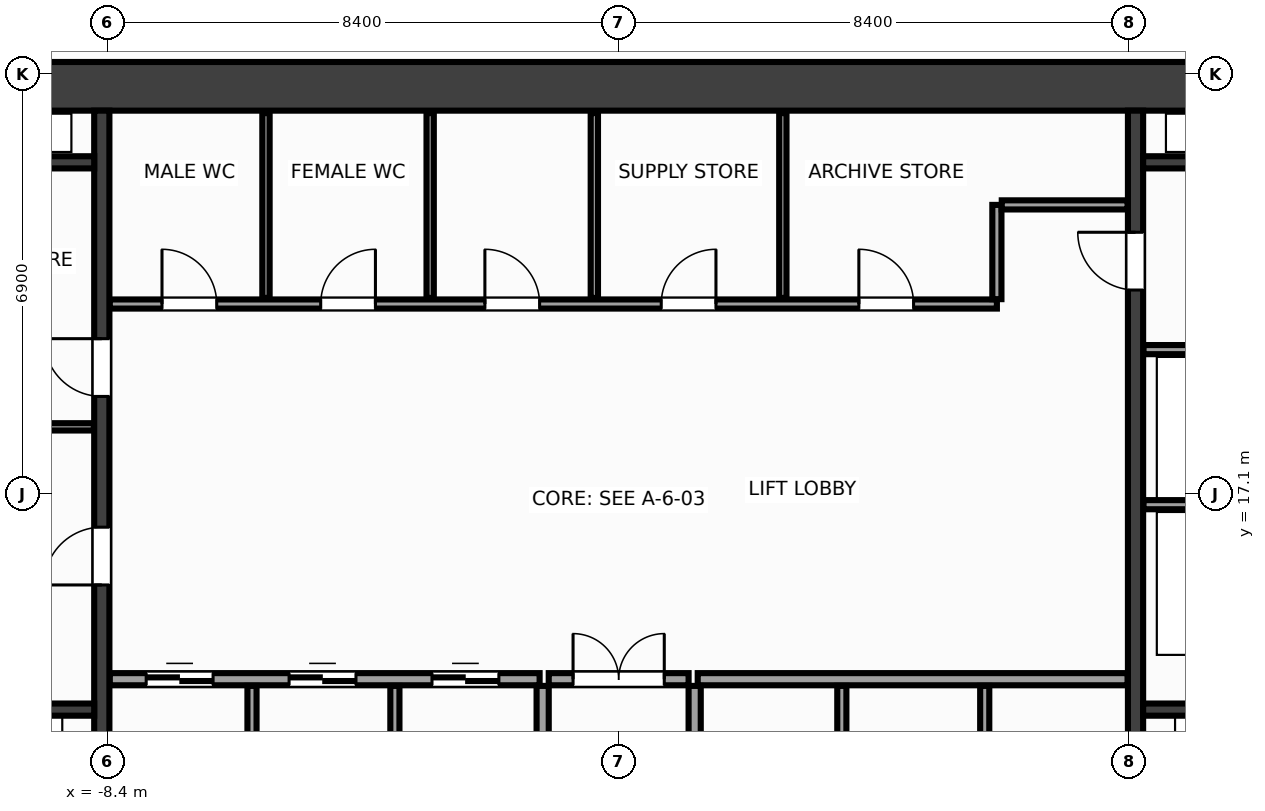
"""IFC4 building model, lengths in metres.
Left out: names, types, materials, properties, quantities, classifications, styles, units other than length and angle.
Written with IfcOpenShell. Run it as: python <this file> out.ifc"""

import sys

from ifc_helpers import new_model, si_unit, direction, frame, frame_2d, origin, place, context, subcontext, project, spatial, rectangle, extrude, source, transform, mapped, element, fill, save


model = new_model("IFC4")
c1 = context("Model", 3, precision=1e-05, world=origin(), true_north=direction((0.0, 1.0)))
c2 = subcontext(c1, "Body", "Model", "MODEL_VIEW")
j1 = project(units=[si_unit("LENGTHUNIT", "METRE"), si_unit("PLANEANGLEUNIT", "RADIAN")], contexts=[c1])
p1 = place(None, origin())
s1 = spatial("IfcSite", under=j1, at=p1, CompositionType="ELEMENT")
p2 = place(p1, origin())
s2 = spatial("IfcBuilding", under=s1, at=p2, CompositionType="ELEMENT")
p3 = place(p2, frame((0.0, 0.0, 59.6)))
s3 = spatial("IfcBuildingStorey", under=s2, at=p3, CompositionType="ELEMENT", Elevation=59.6)
m1 = source(origin(), c2, "Body", "SweptSolid", [
    extrude(rectangle(XDim=32.0, YDim=0.8, at=frame_2d((16.0, 0.0))), origin(), (0.0, 0.0, 1.0), 3.6),
])
p4 = place(p3, frame((-16.0, 23.8, 0.0), z_axis=(0.0, 0.0, 1.0), x_axis=(1.0, 0.0, 0.0)))
e1 = element("IfcWall", 1, at=p4, inside=s3, PredefinedType="SHEAR", context=c2, shape_type="MappedRepresentation", body=[
    mapped(m1, transform((0.0, 0.0, 0.0), x_axis=(1.0, 0.0, 0.0), y_axis=(0.0, 1.0, 0.0), z_axis=(0.0, 0.0, 1.0), scale=1.0)),
])
m2 = source(origin(), c2, "Body", "SweptSolid", [
    extrude(rectangle(XDim=12.8, YDim=0.25, at=frame_2d((6.4, 0.0))), origin(), (0.0, 0.0, 1.0), 3.6),
])
p5 = place(p3, frame((-8.5, 10.6, 0.0), z_axis=(0.0, 0.0, 1.0), x_axis=(0.0, 1.0, 0.0)))
e2 = element("IfcWall", 2, at=p5, inside=s3, PredefinedType="SHEAR", context=c2, shape_type="MappedRepresentation", body=[
    mapped(m2, transform((0.0, 0.0, 0.0), x_axis=(1.0, 0.0, 0.0), y_axis=(0.0, 1.0, 0.0), z_axis=(0.0, 0.0, 1.0), scale=1.0)),
])
p6 = place(p5, frame((5.0, 0.0, 0.0)))
e3 = element("IfcOpeningElement", 3, at=p6, cuts=e2, PredefinedType="OPENING", context=c2, shape_type="SweptSolid", body=[
    extrude(rectangle(XDim=0.95, YDim=2.15, at=frame_2d((0.475, 1.075))), frame((0.0, 0.137, 0.0), z_axis=(0.0, -1.0, 0.0), x_axis=(1.0, 0.0, 0.0)), (0.0, 0.0, 1.0), 0.274),
])
p7 = place(p5, frame((8.1, 0.0, 0.0)))
e4 = element("IfcOpeningElement", 4, at=p7, cuts=e2, PredefinedType="OPENING", context=c2, shape_type="SweptSolid", body=[
    extrude(rectangle(XDim=0.95, YDim=2.15, at=frame_2d((0.475, 1.075))), frame((0.0, 0.137, 0.0), z_axis=(0.0, -1.0, 0.0), x_axis=(1.0, 0.0, 0.0)), (0.0, 0.0, 1.0), 0.274),
])
p8 = place(p3, frame((8.5, 10.6, 0.0), z_axis=(0.0, 0.0, 1.0), x_axis=(0.0, 1.0, 0.0)))
e5 = element("IfcWall", 5, at=p8, inside=s3, PredefinedType="SHEAR", context=c2, shape_type="MappedRepresentation", body=[
    mapped(m2, transform((0.0, 0.0, 0.0), x_axis=(1.0, 0.0, 0.0), y_axis=(0.0, 1.0, 0.0), z_axis=(0.0, 0.0, 1.0), scale=1.0)),
])
p9 = place(p8, frame((9.85, 0.0, 0.0)))
e6 = element("IfcOpeningElement", 6, at=p9, cuts=e5, PredefinedType="OPENING", context=c2, shape_type="SweptSolid", body=[
    extrude(rectangle(XDim=0.95, YDim=2.15, at=frame_2d((0.475, 1.075))), frame((0.0, 0.137, 0.0), z_axis=(0.0, -1.0, 0.0), x_axis=(1.0, 0.0, 0.0)), (0.0, 0.0, 1.0), 0.274),
])
m3 = source(origin(), c2, "Body", "SweptSolid", [
    extrude(rectangle(XDim=2.825, YDim=0.2, at=frame_2d((1.413, 0.0))), origin(), (0.0, 0.0, 1.0), 3.6),
])
for number, where, z_axis, x_axis in (
    (7, (-11.45, 13.55, 0.0), (0.0, 0.0, 1.0), (1.0, 0.0, 0.0)),
    (8, (8.625, 13.55, 0.0), (0.0, 0.0, 1.0), (1.0, 0.0, 0.0)),
):
    element("IfcWall", number, at=place(p3, frame(where, z_axis=z_axis, x_axis=x_axis)), inside=s3, PredefinedType="SHEAR", context=c2, shape_type="MappedRepresentation", body=[
        mapped(m3, transform((0.0, 0.0, 0.0), x_axis=(1.0, 0.0, 0.0), y_axis=(0.0, 1.0, 0.0), z_axis=(0.0, 0.0, 1.0), scale=1.0)),
    ])
m4 = source(origin(), c2, "Body", "SweptSolid", [
    extrude(rectangle(XDim=3.02, YDim=0.2, at=frame_2d((1.51, 0.0))), origin(), (0.0, 0.0, 1.0), 3.6),
])
for number, where, z_axis, x_axis in (
    (9, (-11.645, 22.55, 0.0), (0.0, 0.0, 1.0), (1.0, 0.0, 0.0)),
    (10, (8.625, 22.55, 0.0), (0.0, 0.0, 1.0), (1.0, 0.0, 0.0)),
):
    element("IfcWall", number, at=place(p3, frame(where, z_axis=z_axis, x_axis=x_axis)), inside=s3, PredefinedType="SHEAR", context=c2, shape_type="MappedRepresentation", body=[
        mapped(m4, transform((0.0, 0.0, 0.0), x_axis=(1.0, 0.0, 0.0), y_axis=(0.0, 1.0, 0.0), z_axis=(0.0, 0.0, 1.0), scale=1.0)),
    ])
m5 = source(origin(), c2, "Body", "SweptSolid", [
    extrude(rectangle(XDim=3.01, YDim=0.12, at=frame_2d((1.505, 0.0))), origin(), (0.0, 0.0, 1.0), 3.36),
])
p10 = place(p3, frame((-11.64, 18.2, 0.0), z_axis=(0.0, 0.0, 1.0), x_axis=(1.0, 0.0, 0.0)))
e11 = element("IfcWall", 11, at=p10, inside=s3, PredefinedType="PARTITIONING", context=c2, shape_type="MappedRepresentation", body=[
    mapped(m5, transform((0.0, 0.0, 0.0), x_axis=(1.0, 0.0, 0.0), y_axis=(0.0, 1.0, 0.0), z_axis=(0.0, 0.0, 1.0), scale=1.0)),
])
m6 = source(origin(), c2, "Body", "SweptSolid", [
    extrude(rectangle(XDim=3.01, YDim=0.15, at=frame_2d((1.505, 0.0))), origin(), (0.0, 0.0, 1.0), 3.36),
])
for number, where, z_axis, x_axis in (
    (12, (8.63, 16.92, 0.0), (0.0, 0.0, 1.0), (1.0, 0.0, 0.0)),
    (13, (8.63, 19.47, 0.0), (0.0, 0.0, 1.0), (1.0, 0.0, 0.0)),
):
    element("IfcWall", number, at=place(p3, frame(where, z_axis=z_axis, x_axis=x_axis)), inside=s3, PredefinedType="PARTITIONING", context=c2, shape_type="MappedRepresentation", body=[
        mapped(m6, transform((0.0, 0.0, 0.0), x_axis=(1.0, 0.0, 0.0), y_axis=(0.0, 1.0, 0.0), z_axis=(0.0, 0.0, 1.0), scale=1.0)),
    ])
m7 = source(origin(), c2, "Body", "SweptSolid", [
    extrude(rectangle(XDim=7.07, YDim=0.2, at=frame_2d((3.535, 0.0))), origin(), (0.0, 0.0, 1.0), 3.36),
])
p11 = place(p3, frame((-8.37, 14.05, 0.0), z_axis=(0.0, 0.0, 1.0), x_axis=(1.0, 0.0, 0.0)))
e14 = element("IfcWall", 14, at=p11, inside=s3, PredefinedType="PARTITIONING", context=c2, shape_type="MappedRepresentation", body=[
    mapped(m7, transform((0.0, 0.0, 0.0), x_axis=(1.0, 0.0, 0.0), y_axis=(0.0, 1.0, 0.0), z_axis=(0.0, 0.0, 1.0), scale=1.0)),
])
p12 = place(p11, frame((0.6, 0.0, 0.0)))
e15 = element("IfcOpeningElement", 15, at=p12, cuts=e14, PredefinedType="OPENING", context=c2, shape_type="SweptSolid", body=[
    extrude(rectangle(XDim=1.1, YDim=2.15, at=frame_2d((0.55, 1.075))), frame((0.0, 0.112, 0.0), z_axis=(0.0, -1.0, 0.0), x_axis=(1.0, 0.0, 0.0)), (0.0, 0.0, 1.0), 0.224),
])
p13 = place(p11, frame((2.95, 0.0, 0.0)))
e16 = element("IfcOpeningElement", 16, at=p13, cuts=e14, PredefinedType="OPENING", context=c2, shape_type="SweptSolid", body=[
    extrude(rectangle(XDim=1.1, YDim=2.15, at=frame_2d((0.55, 1.075))), frame((0.0, 0.112, 0.0), z_axis=(0.0, -1.0, 0.0), x_axis=(1.0, 0.0, 0.0)), (0.0, 0.0, 1.0), 0.224),
])
p14 = place(p11, frame((5.3, 0.0, 0.0)))
e17 = element("IfcOpeningElement", 17, at=p14, cuts=e14, PredefinedType="OPENING", context=c2, shape_type="SweptSolid", body=[
    extrude(rectangle(XDim=1.1, YDim=2.15, at=frame_2d((0.55, 1.075))), frame((0.0, 0.112, 0.0), z_axis=(0.0, -1.0, 0.0), x_axis=(1.0, 0.0, 0.0)), (0.0, 0.0, 1.0), 0.224),
])
p15 = place(p3, frame((1.3, 14.05, 0.0), z_axis=(0.0, 0.0, 1.0), x_axis=(1.0, 0.0, 0.0)))
e18 = element("IfcWall", 18, at=p15, inside=s3, PredefinedType="PARTITIONING", context=c2, shape_type="MappedRepresentation", body=[
    mapped(m7, transform((0.0, 0.0, 0.0), x_axis=(1.0, 0.0, 0.0), y_axis=(0.0, 1.0, 0.0), z_axis=(0.0, 0.0, 1.0), scale=1.0)),
])
m8 = source(origin(), c2, "Body", "SweptSolid", [
    extrude(rectangle(XDim=3.34, YDim=0.2, at=frame_2d((1.67, 0.0))), origin(), (0.0, 0.0, 1.0), 3.36),
])
for number, where, z_axis, x_axis in (
    (19, (-1.25, 10.6, 0.0), (0.0, 0.0, 1.0), (0.0, 1.0, 0.0)),
    (20, (1.25, 10.6, 0.0), (0.0, 0.0, 1.0), (0.0, 1.0, 0.0)),
):
    element("IfcWall", number, at=place(p3, frame(where, z_axis=z_axis, x_axis=x_axis)), inside=s3, PredefinedType="PARTITIONING", context=c2, shape_type="MappedRepresentation", body=[
        mapped(m8, transform((0.0, 0.0, 0.0), x_axis=(1.0, 0.0, 0.0), y_axis=(0.0, 1.0, 0.0), z_axis=(0.0, 0.0, 1.0), scale=1.0)),
    ])
m9 = source(origin(), c2, "Body", "SweptSolid", [
    extrude(rectangle(XDim=2.3, YDim=0.2, at=frame_2d((1.15, 0.0))), origin(), (0.0, 0.0, 1.0), 3.36),
])
p16 = place(p3, frame((-1.15, 14.05, 0.0), z_axis=(0.0, 0.0, 1.0), x_axis=(1.0, 0.0, 0.0)))
e21 = element("IfcWall", 21, at=p16, inside=s3, PredefinedType="PARTITIONING", context=c2, shape_type="MappedRepresentation", body=[
    mapped(m9, transform((0.0, 0.0, 0.0), x_axis=(1.0, 0.0, 0.0), y_axis=(0.0, 1.0, 0.0), z_axis=(0.0, 0.0, 1.0), scale=1.0)),
])
p17 = place(p16, frame((0.4, 0.0, 0.0)))
e22 = element("IfcOpeningElement", 22, at=p17, cuts=e21, PredefinedType="OPENING", context=c2, shape_type="SweptSolid", body=[
    extrude(rectangle(XDim=1.5, YDim=2.2, at=frame_2d((0.75, 1.1))), frame((0.0, 0.112, 0.0), z_axis=(0.0, -1.0, 0.0), x_axis=(1.0, 0.0, 0.0)), (0.0, 0.0, 1.0), 0.224),
])
m10 = source(origin(), c2, "Body", "SweptSolid", [
    extrude(rectangle(XDim=14.59, YDim=0.15, at=frame_2d((7.295, 0.0))), origin(), (0.0, 0.0, 1.0), 3.36),
])
p18 = place(p3, frame((-8.37, 20.22, 0.0), z_axis=(0.0, 0.0, 1.0), x_axis=(1.0, 0.0, 0.0)))
e23 = element("IfcWall", 23, at=p18, inside=s3, PredefinedType="PARTITIONING", context=c2, shape_type="MappedRepresentation", body=[
    mapped(m10, transform((0.0, 0.0, 0.0), x_axis=(1.0, 0.0, 0.0), y_axis=(0.0, 1.0, 0.0), z_axis=(0.0, 0.0, 1.0), scale=1.0)),
])
p19 = place(p18, frame((0.86, 0.0, 0.0)))
e24 = element("IfcOpeningElement", 24, at=p19, cuts=e23, PredefinedType="OPENING", context=c2, shape_type="SweptSolid", body=[
    extrude(rectangle(XDim=0.9, YDim=2.15, at=frame_2d((0.45, 1.075))), frame((0.0, 0.087, 0.0), z_axis=(0.0, -1.0, 0.0), x_axis=(1.0, 0.0, 0.0)), (0.0, 0.0, 1.0), 0.174),
])
p20 = place(p18, frame((3.47, 0.0, 0.0)))
e25 = element("IfcOpeningElement", 25, at=p20, cuts=e23, PredefinedType="OPENING", context=c2, shape_type="SweptSolid", body=[
    extrude(rectangle(XDim=0.9, YDim=2.15, at=frame_2d((0.45, 1.075))), frame((0.0, 0.087, 0.0), z_axis=(0.0, -1.0, 0.0), x_axis=(1.0, 0.0, 0.0)), (0.0, 0.0, 1.0), 0.174),
])
p21 = place(p18, frame((6.17, 0.0, 0.0)))
e26 = element("IfcOpeningElement", 26, at=p21, cuts=e23, PredefinedType="OPENING", context=c2, shape_type="SweptSolid", body=[
    extrude(rectangle(XDim=0.9, YDim=2.15, at=frame_2d((0.45, 1.075))), frame((0.0, 0.087, 0.0), z_axis=(0.0, -1.0, 0.0), x_axis=(1.0, 0.0, 0.0)), (0.0, 0.0, 1.0), 0.174),
])
p22 = place(p18, frame((9.07, 0.0, 0.0)))
e27 = element("IfcOpeningElement", 27, at=p22, cuts=e23, PredefinedType="OPENING", context=c2, shape_type="SweptSolid", body=[
    extrude(rectangle(XDim=0.9, YDim=2.15, at=frame_2d((0.45, 1.075))), frame((0.0, 0.087, 0.0), z_axis=(0.0, -1.0, 0.0), x_axis=(1.0, 0.0, 0.0)), (0.0, 0.0, 1.0), 0.174),
])
p23 = place(p18, frame((12.32, 0.0, 0.0)))
e28 = element("IfcOpeningElement", 28, at=p23, cuts=e23, PredefinedType="OPENING", context=c2, shape_type="SweptSolid", body=[
    extrude(rectangle(XDim=0.9, YDim=2.15, at=frame_2d((0.45, 1.075))), frame((0.0, 0.087, 0.0), z_axis=(0.0, -1.0, 0.0), x_axis=(1.0, 0.0, 0.0)), (0.0, 0.0, 1.0), 0.174),
])
m11 = source(origin(), c2, "Body", "SweptSolid", [
    extrude(rectangle(XDim=1.55, YDim=0.15, at=frame_2d((0.775, 0.0))), origin(), (0.0, 0.0, 1.0), 3.36),
])
p24 = place(p3, frame((6.22, 20.3, 0.0), z_axis=(0.0, 0.0, 1.0), x_axis=(0.0, 1.0, 0.0)))
e29 = element("IfcWall", 29, at=p24, inside=s3, PredefinedType="PARTITIONING", context=c2, shape_type="MappedRepresentation", body=[
    mapped(m11, transform((0.0, 0.0, 0.0), x_axis=(1.0, 0.0, 0.0), y_axis=(0.0, 1.0, 0.0), z_axis=(0.0, 0.0, 1.0), scale=1.0)),
])
m12 = source(origin(), c2, "Body", "SweptSolid", [
    extrude(rectangle(XDim=2.07, YDim=0.15, at=frame_2d((1.035, 0.0))), origin(), (0.0, 0.0, 1.0), 3.36),
])
p25 = place(p3, frame((6.3, 21.85, 0.0), z_axis=(0.0, 0.0, 1.0), x_axis=(1.0, 0.0, 0.0)))
e30 = element("IfcWall", 30, at=p25, inside=s3, PredefinedType="PARTITIONING", context=c2, shape_type="MappedRepresentation", body=[
    mapped(m12, transform((0.0, 0.0, 0.0), x_axis=(1.0, 0.0, 0.0), y_axis=(0.0, 1.0, 0.0), z_axis=(0.0, 0.0, 1.0), scale=1.0)),
])
m13 = source(origin(), c2, "Body", "SweptSolid", [
    extrude(rectangle(XDim=3.34, YDim=0.15, at=frame_2d((1.67, 0.0))), origin(), (0.0, 0.0, 1.0), 3.36),
])
for number, where, z_axis, x_axis in (
    (31, (-6.03, 10.6, 0.0), (0.0, 0.0, 1.0), (0.0, 1.0, 0.0)),
    (32, (-3.68, 10.6, 0.0), (0.0, 0.0, 1.0), (0.0, 1.0, 0.0)),
    (33, (3.67, 10.6, 0.0), (0.0, 0.0, 1.0), (0.0, 1.0, 0.0)),
    (34, (6.02, 10.6, 0.0), (0.0, 0.0, 1.0), (0.0, 1.0, 0.0)),
):
    element("IfcWall", number, at=place(p3, frame(where, z_axis=z_axis, x_axis=x_axis)), inside=s3, PredefinedType="PARTITIONING", context=c2, shape_type="MappedRepresentation", body=[
        mapped(m13, transform((0.0, 0.0, 0.0), x_axis=(1.0, 0.0, 0.0), y_axis=(0.0, 1.0, 0.0), z_axis=(0.0, 0.0, 1.0), scale=1.0)),
    ])
m14 = source(origin(), c2, "Body", "SweptSolid", [
    extrude(rectangle(XDim=3.04, YDim=0.12, at=frame_2d((1.52, 0.0))), origin(), (0.0, 0.0, 1.0), 3.36),
])
for number, where, z_axis, x_axis in (
    (35, (-5.8, 20.32, 0.0), (0.0, 0.0, 1.0), (0.0, 1.0, 0.0)),
    (36, (-3.1, 20.32, 0.0), (0.0, 0.0, 1.0), (0.0, 1.0, 0.0)),
    (37, (-0.4, 20.32, 0.0), (0.0, 0.0, 1.0), (0.0, 1.0, 0.0)),
    (38, (2.7, 20.32, 0.0), (0.0, 0.0, 1.0), (0.0, 1.0, 0.0)),
):
    element("IfcWall", number, at=place(p3, frame(where, z_axis=z_axis, x_axis=x_axis)), inside=s3, PredefinedType="PARTITIONING", context=c2, shape_type="MappedRepresentation", body=[
        mapped(m14, transform((0.0, 0.0, 0.0), x_axis=(1.0, 0.0, 0.0), y_axis=(0.0, 1.0, 0.0), z_axis=(0.0, 0.0, 1.0), scale=1.0)),
    ])
m15 = source(origin(), c2, "Body", "SweptSolid", [
    extrude(rectangle(XDim=0.95, YDim=2.15, at=frame_2d((0.475, 1.075))), frame((0.0, 0.025, 0.0), z_axis=(0.0, -1.0, 0.0), x_axis=(1.0, 0.0, 0.0)), (0.0, 0.0, 1.0), 0.05),
])
p26 = place(p6, origin())
e39 = element("IfcDoor", 39, at=p26, inside=s3, OperationType="SINGLE_SWING_LEFT", PredefinedType="DOOR", context=c2, shape_type="MappedRepresentation", body=[
    mapped(m15, transform((0.0, 0.0, 0.0), x_axis=(1.0, 0.0, 0.0), y_axis=(0.0, 1.0, 0.0), z_axis=(0.0, 0.0, 1.0), scale=1.0)),
])
fill(e3, e39)
p27 = place(p7, origin())
e40 = element("IfcDoor", 40, at=p27, inside=s3, OperationType="SINGLE_SWING_RIGHT", PredefinedType="DOOR", context=c2, shape_type="MappedRepresentation", body=[
    mapped(m15, transform((0.0, 0.0, 0.0), x_axis=(1.0, 0.0, 0.0), y_axis=(0.0, 1.0, 0.0), z_axis=(0.0, 0.0, 1.0), scale=1.0)),
])
fill(e4, e40)
m16 = source(origin(), c2, "Body", "SweptSolid", [
    extrude(rectangle(XDim=0.95, YDim=2.15, at=frame_2d((0.475, 1.075))), frame((0.0, 0.025, 0.0), z_axis=(0.0, -1.0, 0.0), x_axis=(1.0, 0.0, 0.0)), (0.0, 0.0, 1.0), 0.05),
])
p28 = place(p9, origin())
e41 = element("IfcDoor", 41, at=p28, inside=s3, OperationType="SINGLE_SWING_RIGHT", PredefinedType="DOOR", context=c2, shape_type="MappedRepresentation", body=[
    mapped(m16, transform((0.0, 0.0, 0.0), x_axis=(1.0, 0.0, 0.0), y_axis=(0.0, 1.0, 0.0), z_axis=(0.0, 0.0, 1.0), scale=1.0)),
])
fill(e6, e41)
m17 = source(origin(), c2, "Body", "SweptSolid", [
    extrude(rectangle(XDim=1.1, YDim=2.15, at=frame_2d((0.55, 1.075))), frame((0.0, 0.025, 0.0), z_axis=(0.0, -1.0, 0.0), x_axis=(1.0, 0.0, 0.0)), (0.0, 0.0, 1.0), 0.05),
])
p29 = place(p12, origin())
e42 = element("IfcDoor", 42, at=p29, inside=s3, OperationType="DOUBLE_DOOR_SLIDING", PredefinedType="DOOR", context=c2, shape_type="MappedRepresentation", body=[
    mapped(m17, transform((0.0, 0.0, 0.0), x_axis=(1.0, 0.0, 0.0), y_axis=(0.0, 1.0, 0.0), z_axis=(0.0, 0.0, 1.0), scale=1.0)),
])
fill(e15, e42)
p30 = place(p13, origin())
e43 = element("IfcDoor", 43, at=p30, inside=s3, OperationType="DOUBLE_DOOR_SLIDING", PredefinedType="DOOR", context=c2, shape_type="MappedRepresentation", body=[
    mapped(m17, transform((0.0, 0.0, 0.0), x_axis=(1.0, 0.0, 0.0), y_axis=(0.0, 1.0, 0.0), z_axis=(0.0, 0.0, 1.0), scale=1.0)),
])
fill(e16, e43)
p31 = place(p14, origin())
e44 = element("IfcDoor", 44, at=p31, inside=s3, OperationType="DOUBLE_DOOR_SLIDING", PredefinedType="DOOR", context=c2, shape_type="MappedRepresentation", body=[
    mapped(m17, transform((0.0, 0.0, 0.0), x_axis=(1.0, 0.0, 0.0), y_axis=(0.0, 1.0, 0.0), z_axis=(0.0, 0.0, 1.0), scale=1.0)),
])
fill(e17, e44)
m18 = source(origin(), c2, "Body", "SweptSolid", [
    extrude(rectangle(XDim=1.5, YDim=2.2, at=frame_2d((0.75, 1.1))), frame((0.0, 0.025, 0.0), z_axis=(0.0, -1.0, 0.0), x_axis=(1.0, 0.0, 0.0)), (0.0, 0.0, 1.0), 0.05),
])
p32 = place(p17, origin())
e45 = element("IfcDoor", 45, at=p32, inside=s3, OperationType="DOUBLE_DOOR_SINGLE_SWING", PredefinedType="DOOR", context=c2, shape_type="MappedRepresentation", body=[
    mapped(m18, transform((0.0, 0.0, 0.0), x_axis=(1.0, 0.0, 0.0), y_axis=(0.0, 1.0, 0.0), z_axis=(0.0, 0.0, 1.0), scale=1.0)),
])
fill(e22, e45)
m19 = source(origin(), c2, "Body", "SweptSolid", [
    extrude(rectangle(XDim=0.9, YDim=2.15, at=frame_2d((0.45, 1.075))), frame((0.0, 0.025, 0.0), z_axis=(0.0, -1.0, 0.0), x_axis=(1.0, 0.0, 0.0)), (0.0, 0.0, 1.0), 0.05),
])
p33 = place(p19, origin())
e46 = element("IfcDoor", 46, at=p33, inside=s3, OperationType="SINGLE_SWING_LEFT", PredefinedType="DOOR", context=c2, shape_type="MappedRepresentation", body=[
    mapped(m19, transform((0.0, 0.0, 0.0), x_axis=(1.0, 0.0, 0.0), y_axis=(0.0, 1.0, 0.0), z_axis=(0.0, 0.0, 1.0), scale=1.0)),
])
fill(e24, e46)
p34 = place(p20, origin())
e47 = element("IfcDoor", 47, at=p34, inside=s3, OperationType="SINGLE_SWING_RIGHT", PredefinedType="DOOR", context=c2, shape_type="MappedRepresentation", body=[
    mapped(m19, transform((0.0, 0.0, 0.0), x_axis=(1.0, 0.0, 0.0), y_axis=(0.0, 1.0, 0.0), z_axis=(0.0, 0.0, 1.0), scale=1.0)),
])
fill(e25, e47)
p35 = place(p21, origin())
e48 = element("IfcDoor", 48, at=p35, inside=s3, OperationType="SINGLE_SWING_LEFT", PredefinedType="DOOR", context=c2, shape_type="MappedRepresentation", body=[
    mapped(m19, transform((0.0, 0.0, 0.0), x_axis=(1.0, 0.0, 0.0), y_axis=(0.0, 1.0, 0.0), z_axis=(0.0, 0.0, 1.0), scale=1.0)),
])
fill(e26, e48)
p36 = place(p22, origin())
e49 = element("IfcDoor", 49, at=p36, inside=s3, OperationType="SINGLE_SWING_RIGHT", PredefinedType="DOOR", context=c2, shape_type="MappedRepresentation", body=[
    mapped(m19, transform((0.0, 0.0, 0.0), x_axis=(1.0, 0.0, 0.0), y_axis=(0.0, 1.0, 0.0), z_axis=(0.0, 0.0, 1.0), scale=1.0)),
])
fill(e27, e49)
p37 = place(p23, origin())
e50 = element("IfcDoor", 50, at=p37, inside=s3, OperationType="SINGLE_SWING_LEFT", PredefinedType="DOOR", context=c2, shape_type="MappedRepresentation", body=[
    mapped(m19, transform((0.0, 0.0, 0.0), x_axis=(1.0, 0.0, 0.0), y_axis=(0.0, 1.0, 0.0), z_axis=(0.0, 0.0, 1.0), scale=1.0)),
])
fill(e28, e50)
save(model, sys.argv[1])
